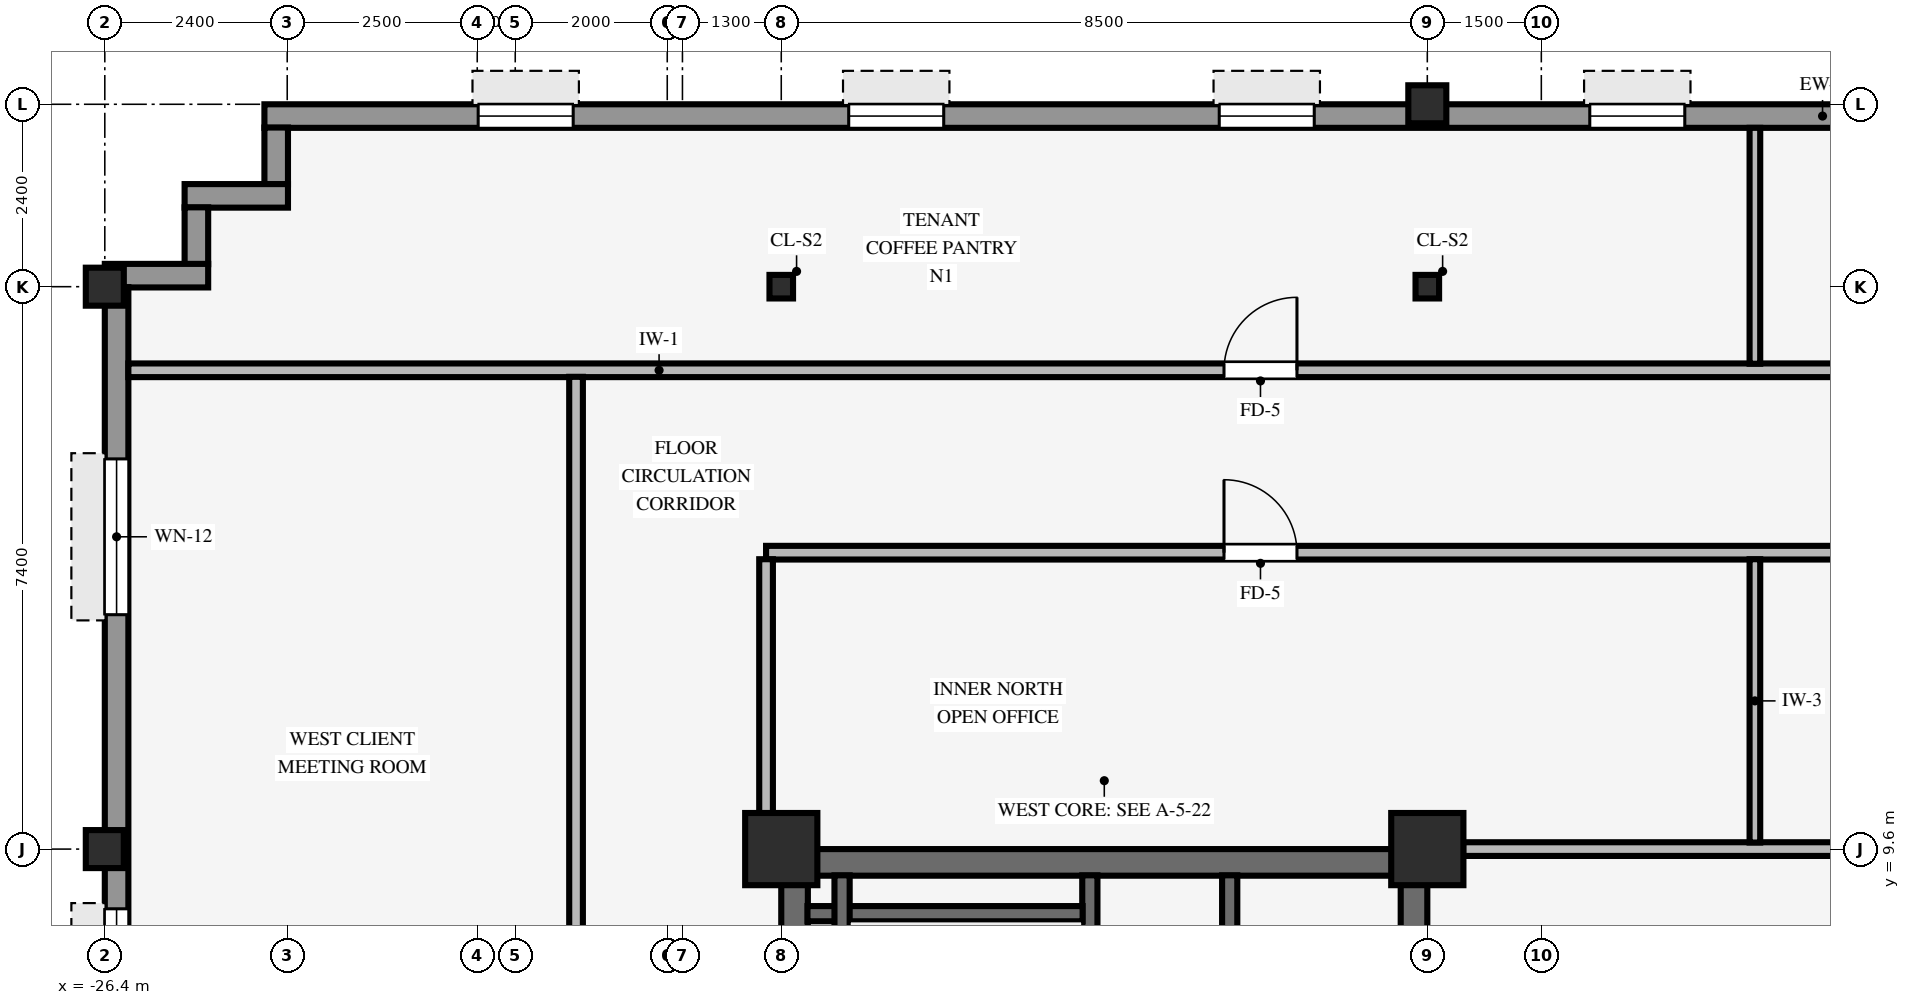
"""IFC4 building model, lengths in metres.
Left out: names, types, materials, properties, quantities, classifications, styles, units other than length and angle.
Written with IfcOpenShell. Run it as: python <this file> out.ifc"""

import sys

from ifc_helpers import new_model, si_unit, direction, frame, frame_2d, origin, origin_2d, place, context, subcontext, project, spatial, rectangle, hollow_rectangle, i_section, extrude, source, transform, mapped, element, fill, save


model = new_model("IFC4")
c1 = context("Model", 3, precision=1e-05, world=origin(), true_north=direction((0.0, 1.0)))
c2 = subcontext(c1, "Body", "Model", "MODEL_VIEW")
j1 = project(units=[si_unit("LENGTHUNIT", "METRE"), si_unit("PLANEANGLEUNIT", "RADIAN")], contexts=[c1])
p1 = place(None, origin())
s1 = spatial("IfcSite", under=j1, at=p1, CompositionType="ELEMENT")
p2 = place(p1, origin())
s2 = spatial("IfcBuilding", under=s1, at=p2, CompositionType="ELEMENT")
p3 = place(p2, frame((0.0, 0.0, 216.45)))
s3 = spatial("IfcBuildingStorey", under=s2, at=p3, CompositionType="ELEMENT", Elevation=216.45)
p4 = place(p3, frame((-17.5, 9.425, 0.0), z_axis=(0.0, 0.0, 1.0), x_axis=(1.0, 0.0, 0.0)))
e1 = element("IfcWall", 1, at=p4, inside=s3, PredefinedType="SHEAR", context=c2, shape_type="SweptSolid", body=[
    extrude(rectangle(XDim=8.5, YDim=0.35, at=frame_2d((4.25, 0.0))), origin(), (0.0, 0.0, 1.0), 3.37),
])
p5 = place(p3, frame((-17.325, -9.255, 0.0), z_axis=(0.0, 0.0, 1.0), x_axis=(0.0, 1.0, 0.0)))
e2 = element("IfcWall", 2, at=p5, inside=s3, PredefinedType="SHEAR", context=c2, shape_type="SweptSolid", body=[
    extrude(rectangle(XDim=18.51, YDim=0.35, at=frame_2d((9.255, 0.0))), origin(), (0.0, 0.0, 1.0), 3.37),
])
p6 = place(p3, frame((-9.175, -9.255, 0.0), z_axis=(0.0, 0.0, 1.0), x_axis=(0.0, 1.0, 0.0)))
e3 = element("IfcWall", 3, at=p6, inside=s3, PredefinedType="SHEAR", context=c2, shape_type="SweptSolid", body=[
    extrude(rectangle(XDim=18.51, YDim=0.35, at=frame_2d((9.255, 0.0))), origin(), (0.0, 0.0, 1.0), 3.37),
])
p7 = place(p6, frame((8.655, 0.0, 0.0)))
e4 = element("IfcOpeningElement", 4, at=p7, cuts=e3, PredefinedType="OPENING", context=c2, shape_type="SweptSolid", body=[
    extrude(rectangle(XDim=1.2, YDim=2.15, at=frame_2d((0.6, 1.075))), frame((0.0, 0.185, 0.0), z_axis=(0.0, -1.0, 0.0), x_axis=(1.0, 0.0, 0.0)), (0.0, 0.0, 1.0), 0.37),
])
for number, where, z_axis, x_axis in (
    (5, (-17.5, 9.6, 0.0), (0.0, 0.0, 1.0), (1.0, 0.0, 0.0)),
    (6, (-9.0, 9.6, 0.0), (0.0, 0.0, 1.0), (1.0, 0.0, 0.0)),
):
    element("IfcColumn", number, at=place(p3, frame(where, z_axis=z_axis, x_axis=x_axis)), inside=s3, PredefinedType="COLUMN", context=c2, shape_type="SweptSolid", body=[
        extrude(rectangle(XDim=0.95, YDim=0.95, at=origin_2d()), origin(), (0.0, 0.0, 1.0), 3.37),
    ])
for number, where, z_axis, x_axis in (
    (7, (-26.4, 9.6, 0.0), (0.0, 0.0, 1.0), (1.0, 0.0, 0.0)),
    (8, (-26.4, 17.0, 0.0), (0.0, 0.0, 1.0), (1.0, 0.0, 0.0)),
    (9, (-9.0, 19.4, 0.0), (0.0, 0.0, 1.0), (1.0, 0.0, 0.0)),
):
    element("IfcColumn", number, at=place(p3, frame(where, z_axis=z_axis, x_axis=x_axis)), inside=s3, PredefinedType="COLUMN", context=c2, shape_type="SweptSolid", body=[
        extrude(hollow_rectangle(XDim=0.5, YDim=0.5, WallThickness=0.032, InnerFilletRadius=0.032, OuterFilletRadius=0.064, at=origin_2d()), origin(), (0.0, 0.0, 1.0), 3.37),
    ])
for number, where, z_axis, x_axis in (
    (10, (-17.5, 17.0, 0.0), (0.0, 0.0, 1.0), (1.0, 0.0, 0.0)),
    (11, (-9.0, 17.0, 0.0), (0.0, 0.0, 1.0), (1.0, 0.0, 0.0)),
):
    element("IfcColumn", number, at=place(p3, frame(where, z_axis=z_axis, x_axis=x_axis)), inside=s3, PredefinedType="COLUMN", context=c2, shape_type="SweptSolid", body=[
        extrude(i_section(OverallWidth=0.31, OverallDepth=0.31, WebThickness=0.015, FlangeThickness=0.015, FilletRadius=0.015, at=origin_2d()), origin(), (0.0, 0.0, 1.0), 3.37),
    ])
p8 = place(p3, frame((-24.3, 19.245, 0.0), z_axis=(0.0, 0.0, 1.0), x_axis=(1.0, 0.0, 0.0)))
e12 = element("IfcWall", 12, at=p8, inside=s3, PredefinedType="STANDARD", context=c2, shape_type="SweptSolid", body=[
    extrude(rectangle(XDim=41.0, YDim=0.31, at=frame_2d((20.5, 0.0))), origin(), (0.0, 0.0, 1.0), 2.705),
])
p9 = place(p8, frame((2.812, 0.0, 0.8)))
e13 = element("IfcOpeningElement", 13, at=p9, cuts=e12, PredefinedType="OPENING", context=c2, shape_type="SweptSolid", body=[
    extrude(rectangle(XDim=1.25, YDim=1.52, at=frame_2d((0.625, 0.76))), frame((0.0, 0.165, 0.0), z_axis=(0.0, -1.0, 0.0), x_axis=(1.0, 0.0, 0.0)), (0.0, 0.0, 1.0), 0.33),
])
p10 = place(p8, frame((7.688, 0.0, 0.8)))
e14 = element("IfcOpeningElement", 14, at=p10, cuts=e12, PredefinedType="OPENING", context=c2, shape_type="SweptSolid", body=[
    extrude(rectangle(XDim=1.25, YDim=1.52, at=frame_2d((0.625, 0.76))), frame((0.0, 0.165, 0.0), z_axis=(0.0, -1.0, 0.0), x_axis=(1.0, 0.0, 0.0)), (0.0, 0.0, 1.0), 0.33),
])
p11 = place(p8, frame((12.562, 0.0, 0.8)))
e15 = element("IfcOpeningElement", 15, at=p11, cuts=e12, PredefinedType="OPENING", context=c2, shape_type="SweptSolid", body=[
    extrude(rectangle(XDim=1.25, YDim=1.52, at=frame_2d((0.625, 0.76))), frame((0.0, 0.165, 0.0), z_axis=(0.0, -1.0, 0.0), x_axis=(1.0, 0.0, 0.0)), (0.0, 0.0, 1.0), 0.33),
])
p12 = place(p8, frame((17.438, 0.0, 0.8)))
e16 = element("IfcOpeningElement", 16, at=p12, cuts=e12, PredefinedType="OPENING", context=c2, shape_type="SweptSolid", body=[
    extrude(rectangle(XDim=1.25, YDim=1.52, at=frame_2d((0.625, 0.76))), frame((0.0, 0.165, 0.0), z_axis=(0.0, -1.0, 0.0), x_axis=(1.0, 0.0, 0.0)), (0.0, 0.0, 1.0), 0.33),
])
p13 = place(p8, frame((22.312, 0.0, 0.8)))
e17 = element("IfcOpeningElement", 17, at=p13, cuts=e12, PredefinedType="OPENING", context=c2, shape_type="SweptSolid", body=[
    extrude(rectangle(XDim=1.25, YDim=1.52, at=frame_2d((0.625, 0.76))), frame((0.0, 0.165, 0.0), z_axis=(0.0, -1.0, 0.0), x_axis=(1.0, 0.0, 0.0)), (0.0, 0.0, 1.0), 0.33),
])
p14 = place(p8, frame((27.188, 0.0, 0.8)))
e18 = element("IfcOpeningElement", 18, at=p14, cuts=e12, PredefinedType="OPENING", context=c2, shape_type="SweptSolid", body=[
    extrude(rectangle(XDim=1.25, YDim=1.52, at=frame_2d((0.625, 0.76))), frame((0.0, 0.165, 0.0), z_axis=(0.0, -1.0, 0.0), x_axis=(1.0, 0.0, 0.0)), (0.0, 0.0, 1.0), 0.33),
])
p15 = place(p8, frame((31.163, 0.0, 0.8)))
e19 = element("IfcOpeningElement", 19, at=p15, cuts=e12, PredefinedType="OPENING", context=c2, shape_type="SweptSolid", body=[
    extrude(rectangle(XDim=1.25, YDim=1.52, at=frame_2d((0.625, 0.76))), frame((0.0, 0.165, 0.0), z_axis=(0.0, -1.0, 0.0), x_axis=(1.0, 0.0, 0.0)), (0.0, 0.0, 1.0), 0.33),
])
p16 = place(p8, frame((36.938, 0.0, 0.8)))
e20 = element("IfcOpeningElement", 20, at=p16, cuts=e12, PredefinedType="OPENING", context=c2, shape_type="SweptSolid", body=[
    extrude(rectangle(XDim=1.25, YDim=1.52, at=frame_2d((0.625, 0.76))), frame((0.0, 0.165, 0.0), z_axis=(0.0, -1.0, 0.0), x_axis=(1.0, 0.0, 0.0)), (0.0, 0.0, 1.0), 0.33),
])
p17 = place(p3, frame((-24.145, 18.346, 0.0), z_axis=(0.0, 0.0, 1.0), x_axis=(0.0, 1.0, 0.0)))
e21 = element("IfcWall", 21, at=p17, inside=s3, PredefinedType="STANDARD", context=c2, shape_type="SweptSolid", body=[
    extrude(rectangle(XDim=0.748, YDim=0.31, at=frame_2d((0.374, 0.0))), origin(), (0.0, 0.0, 1.0), 2.816),
])
p18 = place(p3, frame((-25.35, 18.195, 0.0), z_axis=(0.0, 0.0, 1.0), x_axis=(1.0, 0.0, 0.0)))
e22 = element("IfcWall", 22, at=p18, inside=s3, PredefinedType="STANDARD", context=c2, shape_type="SweptSolid", body=[
    extrude(rectangle(XDim=1.36, YDim=0.31, at=frame_2d((0.68, 0.0))), origin(), (0.0, 0.0, 1.0), 2.816),
])
p19 = place(p3, frame((-25.195, 17.296, 0.0), z_axis=(0.0, 0.0, 1.0), x_axis=(0.0, 1.0, 0.0)))
e23 = element("IfcWall", 23, at=p19, inside=s3, PredefinedType="STANDARD", context=c2, shape_type="SweptSolid", body=[
    extrude(rectangle(XDim=0.748, YDim=0.31, at=frame_2d((0.374, 0.0))), origin(), (0.0, 0.0, 1.0), 2.816),
])
p20 = place(p3, frame((-26.4, 17.145, 0.0), z_axis=(0.0, 0.0, 1.0), x_axis=(1.0, 0.0, 0.0)))
e24 = element("IfcWall", 24, at=p20, inside=s3, PredefinedType="STANDARD", context=c2, shape_type="SweptSolid", body=[
    extrude(rectangle(XDim=1.36, YDim=0.31, at=frame_2d((0.68, 0.0))), origin(), (0.0, 0.0, 1.0), 2.816),
])
p21 = place(p3, frame((-26.245, -16.994, 0.0), z_axis=(0.0, 0.0, 1.0), x_axis=(0.0, 1.0, 0.0)))
e25 = element("IfcWall", 25, at=p21, inside=s3, PredefinedType="STANDARD", context=c2, shape_type="SweptSolid", body=[
    extrude(rectangle(XDim=33.988, YDim=0.31, at=frame_2d((16.994, 0.0))), origin(), (0.0, 0.0, 1.0), 2.705),
])
p22 = place(p21, frame((2.26, 0.0, 0.8)))
e26 = element("IfcOpeningElement", 26, at=p22, cuts=e25, PredefinedType="OPENING", context=c2, shape_type="SweptSolid", body=[
    extrude(rectangle(XDim=2.05, YDim=1.52, at=frame_2d((1.025, 0.76))), frame((0.0, 0.165, 0.0), z_axis=(0.0, -1.0, 0.0), x_axis=(1.0, 0.0, 0.0)), (0.0, 0.0, 1.0), 0.33),
])
p23 = place(p21, frame((8.18, 0.0, 0.8)))
e27 = element("IfcOpeningElement", 27, at=p23, cuts=e25, PredefinedType="OPENING", context=c2, shape_type="SweptSolid", body=[
    extrude(rectangle(XDim=2.05, YDim=1.52, at=frame_2d((1.025, 0.76))), frame((0.0, 0.165, 0.0), z_axis=(0.0, -1.0, 0.0), x_axis=(1.0, 0.0, 0.0)), (0.0, 0.0, 1.0), 0.33),
])
p24 = place(p21, frame((10.949, 0.0, 0.8)))
e28 = element("IfcOpeningElement", 28, at=p24, cuts=e25, PredefinedType="OPENING", context=c2, shape_type="SweptSolid", body=[
    extrude(rectangle(XDim=2.05, YDim=1.52, at=frame_2d((1.025, 0.76))), frame((0.0, 0.165, 0.0), z_axis=(0.0, -1.0, 0.0), x_axis=(1.0, 0.0, 0.0)), (0.0, 0.0, 1.0), 0.33),
])
p25 = place(p21, frame((20.539, 0.0, 0.8)))
e29 = element("IfcOpeningElement", 29, at=p25, cuts=e25, PredefinedType="OPENING", context=c2, shape_type="SweptSolid", body=[
    extrude(rectangle(XDim=2.05, YDim=1.52, at=frame_2d((1.025, 0.76))), frame((0.0, 0.165, 0.0), z_axis=(0.0, -1.0, 0.0), x_axis=(1.0, 0.0, 0.0)), (0.0, 0.0, 1.0), 0.33),
])
p26 = place(p21, frame((23.758, 0.0, 0.8)))
e30 = element("IfcOpeningElement", 30, at=p26, cuts=e25, PredefinedType="OPENING", context=c2, shape_type="SweptSolid", body=[
    extrude(rectangle(XDim=2.05, YDim=1.52, at=frame_2d((1.025, 0.76))), frame((0.0, 0.165, 0.0), z_axis=(0.0, -1.0, 0.0), x_axis=(1.0, 0.0, 0.0)), (0.0, 0.0, 1.0), 0.33),
])
p27 = place(p21, frame((29.678, 0.0, 0.8)))
e31 = element("IfcOpeningElement", 31, at=p27, cuts=e25, PredefinedType="OPENING", context=c2, shape_type="SweptSolid", body=[
    extrude(rectangle(XDim=2.05, YDim=1.52, at=frame_2d((1.025, 0.76))), frame((0.0, 0.165, 0.0), z_axis=(0.0, -1.0, 0.0), x_axis=(1.0, 0.0, 0.0)), (0.0, 0.0, 1.0), 0.33),
])
p28 = place(p3, frame((-13.44, 0.9, 0.0), z_axis=(0.0, 0.0, 1.0), x_axis=(0.0, 1.0, 0.0)))
e32 = element("IfcWall", 32, at=p28, inside=s3, PredefinedType="SHEAR", context=c2, shape_type="SweptSolid", body=[
    extrude(rectangle(XDim=8.355, YDim=0.2, at=frame_2d((4.177, 0.0))), origin(), (0.0, 0.0, 1.0), 3.37),
])
p29 = place(p28, frame((1.53, 0.0, 0.0), z_axis=(0.0, 0.0, 1.0), x_axis=(-1.0, 0.0, 0.0)))
e33 = element("IfcOpeningElement", 33, at=p29, cuts=e32, PredefinedType="OPENING", context=c2, shape_type="SweptSolid", body=[
    extrude(rectangle(XDim=1.1, YDim=2.15, at=frame_2d((0.55, 1.075))), frame((0.0, 0.11, 0.0), z_axis=(0.0, -1.0, 0.0), x_axis=(1.0, 0.0, 0.0)), (0.0, 0.0, 1.0), 0.22),
])
p30 = place(p3, frame((-17.155, 8.75, 0.0), z_axis=(0.0, 0.0, 1.0), x_axis=(1.0, 0.0, 0.0)))
e34 = element("IfcWall", 34, at=p30, inside=s3, PredefinedType="SHEAR", context=c2, shape_type="SweptSolid", body=[
    extrude(rectangle(XDim=3.62, YDim=0.2, at=frame_2d((1.81, 0.0))), origin(), (0.0, 0.0, 1.0), 3.37),
])
p31 = place(p3, frame((-16.7, 1.095, 0.0), z_axis=(0.0, 0.0, 1.0), x_axis=(0.0, 1.0, 0.0)))
e35 = element("IfcWall", 35, at=p31, inside=s3, PredefinedType="SHEAR", context=c2, shape_type="SweptSolid", body=[
    extrude(rectangle(XDim=8.16, YDim=0.2, at=frame_2d((4.08, 0.0))), origin(), (0.0, 0.0, 1.0), 3.37),
])
p32 = place(p3, frame((-11.6, 1.3, 0.0), z_axis=(0.0, 0.0, 1.0), x_axis=(0.0, 1.0, 0.0)))
e36 = element("IfcWall", 36, at=p32, inside=s3, PredefinedType="SHEAR", context=c2, shape_type="SweptSolid", body=[
    extrude(rectangle(XDim=7.955, YDim=0.2, at=frame_2d((3.978, 0.0))), origin(), (0.0, 0.0, 1.0), 3.37),
])
p33 = place(p3, frame((-8.529, 9.6, 0.0), z_axis=(0.0, 0.0, 1.0), x_axis=(1.0, 0.0, 0.0)))
e37 = element("IfcWall", 37, at=p33, inside=s3, PredefinedType="PARTITIONING", context=c2, shape_type="SweptSolid", body=[
    extrude(rectangle(XDim=8.378, YDim=0.18, at=frame_2d((4.189, 0.0))), origin(), (0.0, 0.0, 1.0), 2.405),
])
p34 = place(p3, frame((-17.7, 13.5, 0.0), z_axis=(0.0, 0.0, 1.0), x_axis=(1.0, 0.0, 0.0)))
e38 = element("IfcWall", 38, at=p34, inside=s3, PredefinedType="PARTITIONING", context=c2, shape_type="SweptSolid", body=[
    extrude(rectangle(XDim=24.3, YDim=0.18, at=frame_2d((12.15, 0.0))), origin(), (0.0, 0.0, 1.0), 3.008),
])
p35 = place(p34, frame((6.025, 0.0, 0.0)))
e39 = element("IfcOpeningElement", 39, at=p35, cuts=e38, PredefinedType="OPENING", context=c2, shape_type="SweptSolid", body=[
    extrude(rectangle(XDim=0.96, YDim=2.1, at=frame_2d((0.48, 1.05))), frame((0.0, 0.1, 0.0), z_axis=(0.0, -1.0, 0.0), x_axis=(1.0, 0.0, 0.0)), (0.0, 0.0, 1.0), 0.2),
])
p36 = place(p34, frame((18.175, 0.0, 0.0)))
e40 = element("IfcOpeningElement", 40, at=p36, cuts=e38, PredefinedType="OPENING", context=c2, shape_type="SweptSolid", body=[
    extrude(rectangle(XDim=0.96, YDim=2.1, at=frame_2d((0.48, 1.05))), frame((0.0, 0.1, 0.0), z_axis=(0.0, -1.0, 0.0), x_axis=(1.0, 0.0, 0.0)), (0.0, 0.0, 1.0), 0.2),
])
p37 = place(p3, frame((-26.09, 15.9, 0.0), z_axis=(0.0, 0.0, 1.0), x_axis=(1.0, 0.0, 0.0)))
e41 = element("IfcWall", 41, at=p37, inside=s3, PredefinedType="PARTITIONING", context=c2, shape_type="SweptSolid", body=[
    extrude(rectangle(XDim=35.09, YDim=0.18, at=frame_2d((17.545, 0.0))), origin(), (0.0, 0.0, 1.0), 3.36),
])
p38 = place(p37, frame((14.415, 0.0, 0.0)))
e42 = element("IfcOpeningElement", 42, at=p38, cuts=e41, PredefinedType="OPENING", context=c2, shape_type="SweptSolid", body=[
    extrude(rectangle(XDim=0.96, YDim=2.1, at=frame_2d((0.48, 1.05))), frame((0.0, 0.1, 0.0), z_axis=(0.0, -1.0, 0.0), x_axis=(1.0, 0.0, 0.0)), (0.0, 0.0, 1.0), 0.2),
])
p39 = place(p37, frame((26.565, 0.0, 0.0)))
e43 = element("IfcOpeningElement", 43, at=p39, cuts=e41, PredefinedType="OPENING", context=c2, shape_type="SweptSolid", body=[
    extrude(rectangle(XDim=0.96, YDim=2.1, at=frame_2d((0.48, 1.05))), frame((0.0, 0.1, 0.0), z_axis=(0.0, -1.0, 0.0), x_axis=(1.0, 0.0, 0.0)), (0.0, 0.0, 1.0), 0.2),
])
p40 = place(p3, frame((-20.2, -15.814, 0.0), z_axis=(0.0, 0.0, 1.0), x_axis=(0.0, 1.0, 0.0)))
e44 = element("IfcWall", 44, at=p40, inside=s3, PredefinedType="PARTITIONING", context=c2, shape_type="SweptSolid", body=[
    extrude(rectangle(XDim=31.628, YDim=0.18, at=frame_2d((15.814, 0.0))), origin(), (0.0, 0.0, 1.0), 3.36),
])
p41 = place(p40, frame((20.334, 0.0, 0.0)))
e45 = element("IfcOpeningElement", 45, at=p41, cuts=e44, PredefinedType="OPENING", context=c2, shape_type="SweptSolid", body=[
    extrude(rectangle(XDim=0.96, YDim=2.1, at=frame_2d((0.48, 1.05))), frame((0.0, 0.1, 0.0), z_axis=(0.0, -1.0, 0.0), x_axis=(1.0, 0.0, 0.0)), (0.0, 0.0, 1.0), 0.2),
])
p42 = place(p40, frame((6.834, 0.0, 0.0)))
e46 = element("IfcOpeningElement", 46, at=p42, cuts=e44, PredefinedType="OPENING", context=c2, shape_type="SweptSolid", body=[
    extrude(rectangle(XDim=0.96, YDim=2.1, at=frame_2d((0.48, 1.05))), frame((0.0, 0.1, 0.0), z_axis=(0.0, -1.0, 0.0), x_axis=(1.0, 0.0, 0.0)), (0.0, 0.0, 1.0), 0.2),
])
p43 = place(p3, frame((-17.7, 10.071, 0.0), z_axis=(0.0, 0.0, 1.0), x_axis=(0.0, 1.0, 0.0)))
e47 = element("IfcWall", 47, at=p43, inside=s3, PredefinedType="PARTITIONING", context=c2, shape_type="SweptSolid", body=[
    extrude(rectangle(XDim=3.343, YDim=0.18, at=frame_2d((1.671, 0.0))), origin(), (0.0, 0.0, 1.0), 2.816),
])
p44 = place(p3, frame((-4.69, 9.686, 0.0), z_axis=(0.0, 0.0, 1.0), x_axis=(0.0, 1.0, 0.0)))
e48 = element("IfcWall", 48, at=p44, inside=s3, PredefinedType="PARTITIONING", context=c2, shape_type="SweptSolid", body=[
    extrude(rectangle(XDim=3.728, YDim=0.14, at=frame_2d((1.864, 0.0))), origin(), (0.0, 0.0, 1.0), 3.36),
])
p45 = place(p3, frame((-4.69, 15.986, 0.0), z_axis=(0.0, 0.0, 1.0), x_axis=(0.0, 1.0, 0.0)))
e49 = element("IfcWall", 49, at=p45, inside=s3, PredefinedType="PARTITIONING", context=c2, shape_type="SweptSolid", body=[
    extrude(rectangle(XDim=3.104, YDim=0.14, at=frame_2d((1.552, 0.0))), origin(), (0.0, 0.0, 1.0), 3.36),
])
m1 = source(origin(), c2, "Body", "SweptSolid", [
    extrude(rectangle(XDim=1.25, YDim=1.52, at=frame_2d((0.625, 0.76))), frame((0.0, 0.03, 0.0), z_axis=(0.0, -1.0, 0.0), x_axis=(1.0, 0.0, 0.0)), (0.0, 0.0, 1.0), 0.06),
])
p46 = place(p9, origin())
e50 = element("IfcWindow", 50, at=p46, inside=s3, PartitioningType="SINGLE_PANEL", PredefinedType="WINDOW", context=c2, shape_type="MappedRepresentation", body=[
    mapped(m1, transform((0.0, 0.0, 0.0), scale=1.0)),
])
fill(e13, e50)
p47 = place(p10, origin())
e51 = element("IfcWindow", 51, at=p47, inside=s3, PartitioningType="SINGLE_PANEL", PredefinedType="WINDOW", context=c2, shape_type="MappedRepresentation", body=[
    mapped(m1, transform((0.0, 0.0, 0.0), scale=1.0)),
])
fill(e14, e51)
p48 = place(p11, origin())
e52 = element("IfcWindow", 52, at=p48, inside=s3, PartitioningType="SINGLE_PANEL", PredefinedType="WINDOW", context=c2, shape_type="MappedRepresentation", body=[
    mapped(m1, transform((0.0, 0.0, 0.0), scale=1.0)),
])
fill(e15, e52)
p49 = place(p12, origin())
e53 = element("IfcWindow", 53, at=p49, inside=s3, PartitioningType="SINGLE_PANEL", PredefinedType="WINDOW", context=c2, shape_type="MappedRepresentation", body=[
    mapped(m1, transform((0.0, 0.0, 0.0), scale=1.0)),
])
fill(e16, e53)
m2 = source(origin(), c2, "Body", "SweptSolid", [
    extrude(rectangle(XDim=2.05, YDim=1.52, at=frame_2d((1.025, 0.76))), frame((0.0, 0.03, 0.0), z_axis=(0.0, -1.0, 0.0), x_axis=(1.0, 0.0, 0.0)), (0.0, 0.0, 1.0), 0.06),
])
p50 = place(p26, origin())
e54 = element("IfcWindow", 54, at=p50, inside=s3, PartitioningType="SINGLE_PANEL", PredefinedType="WINDOW", context=c2, shape_type="MappedRepresentation", body=[
    mapped(m2, transform((0.0, 0.0, 0.0), scale=1.0)),
])
fill(e30, e54)
p51 = place(p27, origin())
e55 = element("IfcWindow", 55, at=p51, inside=s3, PartitioningType="SINGLE_PANEL", PredefinedType="WINDOW", context=c2, shape_type="MappedRepresentation", body=[
    mapped(m2, transform((0.0, 0.0, 0.0), scale=1.0)),
])
fill(e31, e55)
m3 = source(origin(), c2, "Body", "SweptSolid", [
    extrude(rectangle(XDim=0.96, YDim=2.1, at=frame_2d((0.48, 1.05))), frame((0.0, 0.025, 0.0), z_axis=(0.0, -1.0, 0.0), x_axis=(1.0, 0.0, 0.0)), (0.0, 0.0, 1.0), 0.05),
])
p52 = place(p38, origin())
e56 = element("IfcDoor", 56, at=p52, inside=s3, OperationType="SINGLE_SWING_RIGHT", PredefinedType="DOOR", context=c2, shape_type="MappedRepresentation", body=[
    mapped(m3, transform((0.0, 0.0, 0.0), scale=1.0)),
])
fill(e42, e56)
p53 = place(p35, origin())
e57 = element("IfcDoor", 57, at=p53, inside=s3, OperationType="SINGLE_SWING_LEFT", PredefinedType="DOOR", context=c2, shape_type="MappedRepresentation", body=[
    mapped(m3, transform((0.0, 0.0, 0.0), scale=1.0)),
])
fill(e39, e57)
save(model, sys.argv[1])
